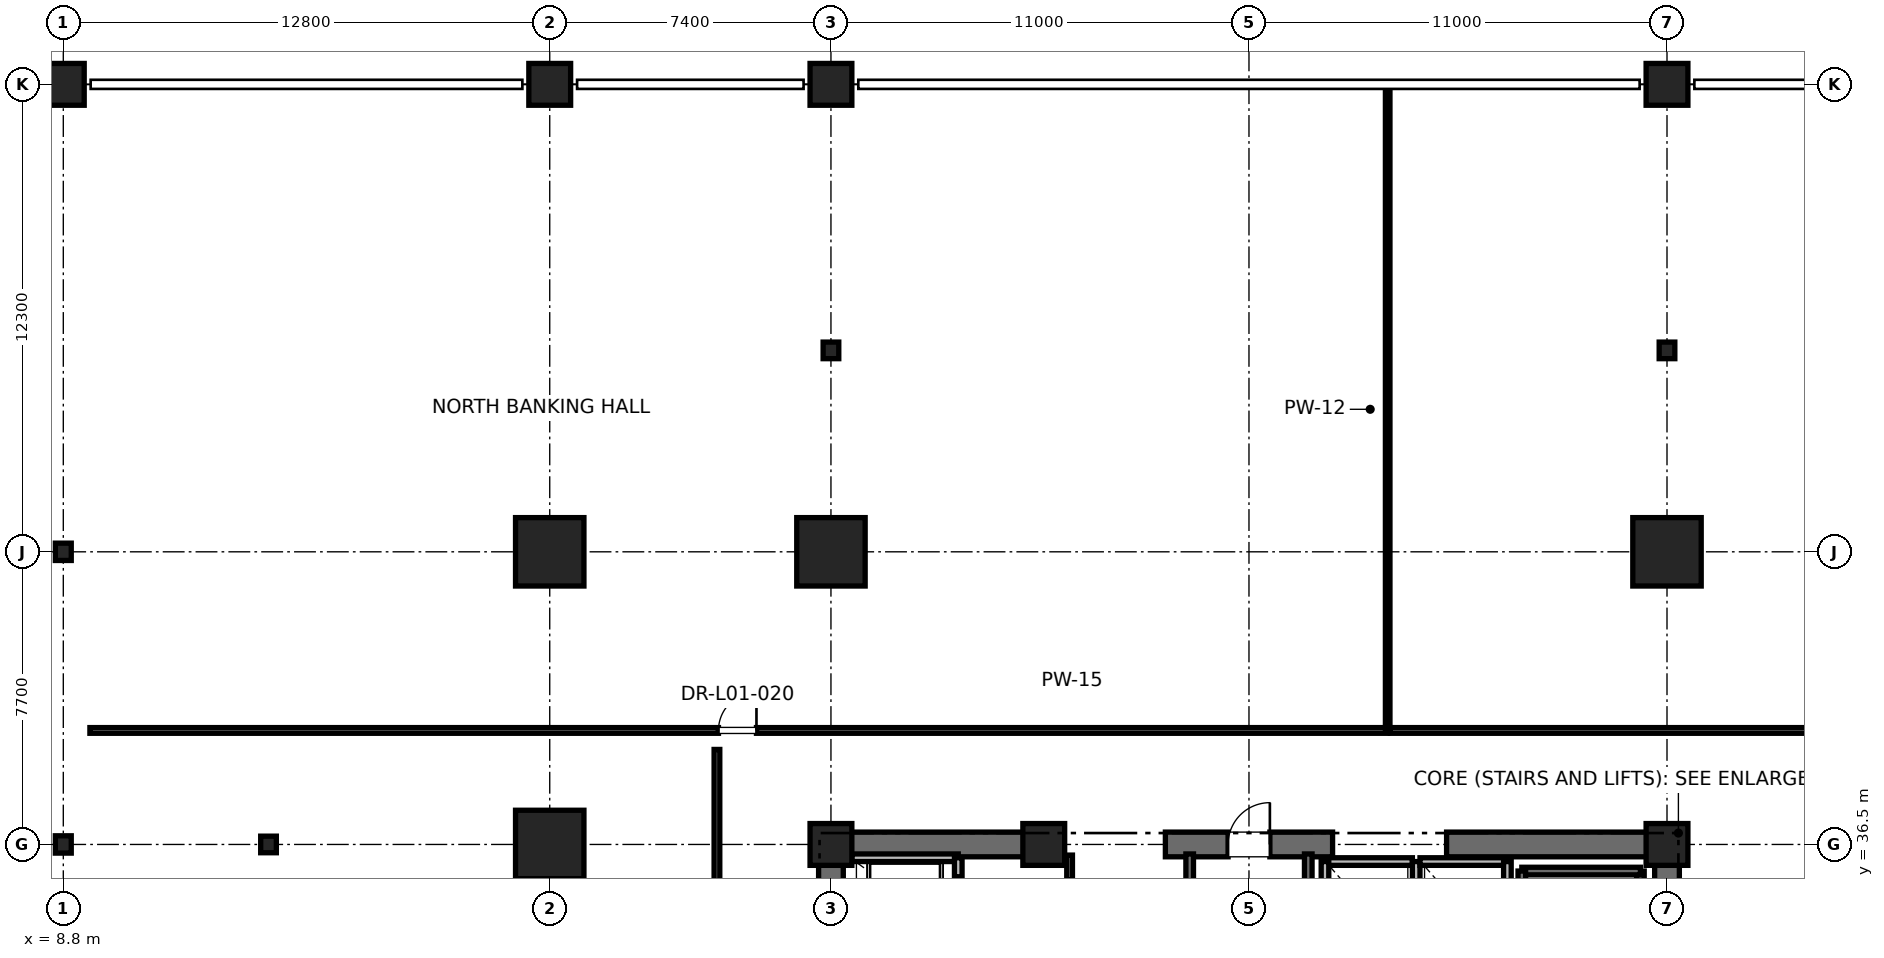
"""IFC4 building model, lengths in metres.
Left out: names, types, materials, properties, quantities, classifications, styles, units other than length and angle.
Written with IfcOpenShell. Run it as: python <this file> out.ifc"""

import sys

from ifc_helpers import new_model, si_unit, direction, frame, frame_2d, origin, origin_2d, place, context, subcontext, project, spatial, rectangle, i_section, extrude, element, fill, save


model = new_model("IFC4")
c1 = context("Model", 3, precision=1e-05, world=origin(), true_north=direction((0.0, 1.0)))
c2 = subcontext(c1, "Body", "Model", "MODEL_VIEW")
j1 = project(units=[si_unit("LENGTHUNIT", "METRE"), si_unit("PLANEANGLEUNIT", "RADIAN")], contexts=[c1])
p1 = place(None, origin())
s1 = spatial("IfcSite", under=j1, at=p1, CompositionType="ELEMENT")
p2 = place(p1, origin())
s2 = spatial("IfcBuilding", under=s1, at=p2, CompositionType="ELEMENT")
p3 = place(p2, frame((0.0, 0.0, 6.0)))
s3 = spatial("IfcBuildingStorey", under=s2, at=p3, CompositionType="ELEMENT", Elevation=6.0)
for number, where, z_axis, x_axis in (
    (1, (29.0, 44.2, 0.0), (0.0, 0.0, 1.0), (1.0, 0.0, 0.0)),
    (2, (51.0, 44.2, 0.0), (0.0, 0.0, 1.0), (1.0, 0.0, 0.0)),
    (3, (21.6, 36.5, 0.0), (0.0, 0.0, 1.0), (1.0, 0.0, 0.0)),
    (4, (21.6, 44.2, 0.0), (0.0, 0.0, 1.0), (1.0, 0.0, 0.0)),
):
    element("IfcColumn", number, at=place(p3, frame(where, z_axis=z_axis, x_axis=x_axis)), inside=s3, PredefinedType="COLUMN", context=c2, shape_type="SweptSolid", body=[
        extrude(rectangle(XDim=1.8, YDim=1.8, at=origin_2d()), origin(), (0.0, 0.0, 1.0), 5.2),
    ])
for number, where, z_axis, x_axis in (
    (5, (14.2, 36.5, 0.0), (0.0, 0.0, 1.0), (1.0, 0.0, 0.0)),
    (6, (29.0, 49.5, 0.0), (0.0, 0.0, 1.0), (1.0, 0.0, 0.0)),
    (7, (51.0, 49.5, 0.0), (0.0, 0.0, 1.0), (1.0, 0.0, 0.0)),
):
    element("IfcColumn", number, at=place(p3, frame(where, z_axis=z_axis, x_axis=x_axis)), inside=s3, PredefinedType="COLUMN", context=c2, shape_type="SweptSolid", body=[
        extrude(i_section(OverallWidth=0.412, OverallDepth=0.437, WebThickness=0.036, FlangeThickness=0.058, FilletRadius=0.015, at=origin_2d()), origin(), (0.0, 0.0, 1.0), 5.2),
    ])
for number, where, z_axis, x_axis in (
    (8, (29.0, 36.5, 0.0), (0.0, 0.0, 1.0), (1.0, 0.0, 0.0)),
    (9, (51.0, 36.5, 0.0), (0.0, 0.0, 1.0), (1.0, 0.0, 0.0)),
    (10, (34.6, 36.5, 0.0), (0.0, 0.0, 1.0), (1.0, 0.0, 0.0)),
):
    element("IfcColumn", number, at=place(p3, frame(where, z_axis=z_axis, x_axis=x_axis)), inside=s3, PredefinedType="PILASTER", context=c2, shape_type="SweptSolid", body=[
        extrude(rectangle(XDim=1.1, YDim=1.1, at=origin_2d()), origin(), (0.0, 0.0, 1.0), 5.2),
    ])
for number, where, z_axis, x_axis in (
    (11, (8.8, 56.5, 0.0), (0.0, 0.0, 1.0), (1.0, 0.0, 0.0)),
    (12, (21.6, 56.5, 0.0), (0.0, 0.0, 1.0), (1.0, 0.0, 0.0)),
    (13, (29.0, 56.5, 0.0), (0.0, 0.0, 1.0), (1.0, 0.0, 0.0)),
    (14, (51.0, 56.5, 0.0), (0.0, 0.0, 1.0), (1.0, 0.0, 0.0)),
):
    element("IfcColumn", number, at=place(p3, frame(where, z_axis=z_axis, x_axis=x_axis)), inside=s3, PredefinedType="COLUMN", context=c2, shape_type="SweptSolid", body=[
        extrude(rectangle(XDim=1.1, YDim=1.1, at=origin_2d()), origin(), (0.0, 0.0, 1.0), 5.2),
    ])
for number, where, z_axis, x_axis in (
    (15, (8.8, 36.5, 0.0), (0.0, 0.0, 1.0), (1.0, 0.0, 0.0)),
    (16, (8.8, 44.2, 0.0), (0.0, 0.0, 1.0), (1.0, 0.0, 0.0)),
):
    element("IfcColumn", number, at=place(p3, frame(where, z_axis=z_axis, x_axis=x_axis)), inside=s3, PredefinedType="COLUMN", context=c2, shape_type="SweptSolid", body=[
        extrude(i_section(OverallWidth=0.418, OverallDepth=0.456, WebThickness=0.042, FlangeThickness=0.067, FilletRadius=0.015, at=origin_2d()), origin(), (0.0, 0.0, 1.0), 5.2),
    ])
p4 = place(p3, frame((29.0, 36.5, 0.0), z_axis=(0.0, 0.0, 1.0), x_axis=(1.0, 0.0, 0.0)))
e17 = element("IfcWall", 17, at=p4, inside=s3, PredefinedType="SHEAR", context=c2, shape_type="SweptSolid", body=[
    extrude(rectangle(XDim=5.8, YDim=0.65, at=frame_2d((2.9, 0.0))), origin(), (0.0, 0.0, 1.0), 4.92),
])
p5 = place(p3, frame((37.8, 36.5, 0.0), z_axis=(0.0, 0.0, 1.0), x_axis=(1.0, 0.0, 0.0)))
e18 = element("IfcWall", 18, at=p5, inside=s3, PredefinedType="SHEAR", context=c2, shape_type="SweptSolid", body=[
    extrude(rectangle(XDim=4.4, YDim=0.65, at=frame_2d((2.2, 0.0))), origin(), (0.0, 0.0, 1.0), 4.92),
])
p6 = place(p5, frame((1.65, 0.0, 0.0)))
e19 = element("IfcOpeningElement", 19, at=p6, cuts=e18, PredefinedType="OPENING", context=c2, shape_type="SweptSolid", body=[
    extrude(rectangle(XDim=1.1, YDim=2.15, at=frame_2d((0.55, 1.075))), frame((0.0, 0.325, 0.0), z_axis=(0.0, -1.0, 0.0), x_axis=(1.0, 0.0, 0.0)), (0.0, 0.0, 1.0), 0.65),
])
for number, where, z_axis, x_axis in (
    (20, (45.2, 36.5, 0.0), (0.0, 0.0, 1.0), (1.0, 0.0, 0.0)),
    (21, (29.0, 30.7, 0.0), (0.0, 0.0, 1.0), (0.0, 1.0, 0.0)),
):
    element("IfcWall", number, at=place(p3, frame(where, z_axis=z_axis, x_axis=x_axis)), inside=s3, PredefinedType="SHEAR", context=c2, shape_type="SweptSolid", body=[
        extrude(rectangle(XDim=5.8, YDim=0.65, at=frame_2d((2.9, 0.0))), origin(), (0.0, 0.0, 1.0), 4.92),
    ])
p7 = place(p3, frame((51.0, 27.7, 0.0), z_axis=(0.0, 0.0, 1.0), x_axis=(0.0, 1.0, 0.0)))
e22 = element("IfcWall", 22, at=p7, inside=s3, PredefinedType="SHEAR", context=c2, shape_type="SweptSolid", body=[
    extrude(rectangle(XDim=8.8, YDim=0.65, at=frame_2d((4.4, 0.0))), origin(), (0.0, 0.0, 1.0), 4.92),
])
p8 = place(p3, frame((50.3, 27.65, 0.0), z_axis=(0.0, 0.0, 1.0), x_axis=(0.0, 1.0, 0.0)))
e23 = element("IfcWall", 23, at=p8, inside=s3, PredefinedType="SOLIDWALL", context=c2, shape_type="SweptSolid", body=[
    extrude(rectangle(XDim=8.15, YDim=0.2, at=frame_2d((4.075, 0.0))), origin(), (0.0, 0.0, 1.0), 4.92),
])
p9 = place(p3, frame((47.18, 35.8, 0.0), z_axis=(0.0, 0.0, 1.0), x_axis=(1.0, 0.0, 0.0)))
e24 = element("IfcWall", 24, at=p9, inside=s3, PredefinedType="SOLIDWALL", context=c2, shape_type="SweptSolid", body=[
    extrude(rectangle(XDim=3.12, YDim=0.2, at=frame_2d((1.56, 0.0))), origin(), (0.0, 0.0, 1.0), 4.92),
])
p10 = place(p3, frame((47.18, 27.62, 0.0), z_axis=(0.0, 0.0, 1.0), x_axis=(0.0, 1.0, 0.0)))
e25 = element("IfcWall", 25, at=p10, inside=s3, PredefinedType="SOLIDWALL", context=c2, shape_type="SweptSolid", body=[
    extrude(rectangle(XDim=8.18, YDim=0.2, at=frame_2d((4.09, 0.0))), origin(), (0.0, 0.0, 1.0), 4.92),
])
p11 = place(p3, frame((38.44, 27.38, 0.0), z_axis=(0.0, 0.0, 1.0), x_axis=(0.0, 1.0, 0.0)))
e26 = element("IfcWall", 26, at=p11, inside=s3, PredefinedType="SOLIDWALL", context=c2, shape_type="SweptSolid", body=[
    extrude(rectangle(XDim=8.87, YDim=0.2, at=frame_2d((4.435, 0.0))), origin(), (0.0, 0.0, 1.0), 4.92),
])
p12 = place(p3, frame((41.56, 27.68, 0.0), z_axis=(0.0, 0.0, 1.0), x_axis=(0.0, 1.0, 0.0)))
e27 = element("IfcWall", 27, at=p12, inside=s3, PredefinedType="SOLIDWALL", context=c2, shape_type="SweptSolid", body=[
    extrude(rectangle(XDim=8.57, YDim=0.2, at=frame_2d((4.285, 0.0))), origin(), (0.0, 0.0, 1.0), 4.92),
])
p13 = place(p3, frame((32.35, 36.15, 0.0), z_axis=(0.0, 0.0, 1.0), x_axis=(-1.0, 0.0, 0.0)))
e28 = element("IfcWall", 28, at=p13, inside=s3, PredefinedType="SOLIDWALL", context=c2, shape_type="SweptSolid", body=[
    extrude(rectangle(XDim=2.8, YDim=0.2, at=frame_2d((1.4, 0.0))), origin(), (0.0, 0.0, 1.0), 3.979),
])
p14 = place(p3, frame((32.35, 34.05, 0.0), z_axis=(0.0, 0.0, 1.0), x_axis=(0.0, 1.0, 0.0)))
e29 = element("IfcWall", 29, at=p14, inside=s3, PredefinedType="SOLIDWALL", context=c2, shape_type="SweptSolid", body=[
    extrude(rectangle(XDim=2.1, YDim=0.2, at=frame_2d((1.05, 0.0))), origin(), (0.0, 0.0, 1.0), 4.92),
])
p15 = place(p14, frame((0.5, 0.0, 0.0)))
e30 = element("IfcOpeningElement", 30, at=p15, cuts=e29, PredefinedType="OPENING", context=c2, shape_type="SweptSolid", body=[
    extrude(rectangle(XDim=1.1, YDim=2.2, at=frame_2d((0.55, 1.1))), frame((0.0, 0.1, 0.0), z_axis=(0.0, -1.0, 0.0), x_axis=(1.0, 0.0, 0.0)), (0.0, 0.0, 1.0), 0.2),
])
p16 = place(p3, frame((44.3, 36.05, 0.0), z_axis=(0.0, 0.0, 1.0), x_axis=(-1.0, 0.0, 0.0)))
e31 = element("IfcWall", 31, at=p16, inside=s3, PredefinedType="SOLIDWALL", context=c2, shape_type="SweptSolid", body=[
    extrude(rectangle(XDim=2.3, YDim=0.2, at=frame_2d((1.15, 0.0))), origin(), (0.0, 0.0, 1.0), 3.7),
])
for number, where, z_axis, x_axis in (
    (32, (42.0, 36.05, 0.0), (0.0, 0.0, 1.0), (0.0, -1.0, 0.0)),
    (33, (44.4, 33.45, 0.0), (0.0, 0.0, 1.0), (0.0, 1.0, 0.0)),
):
    element("IfcWall", number, at=place(p3, frame(where, z_axis=z_axis, x_axis=x_axis)), inside=s3, PredefinedType="SOLIDWALL", context=c2, shape_type="SweptSolid", body=[
        extrude(rectangle(XDim=2.6, YDim=0.2, at=frame_2d((1.3, 0.0))), origin(), (0.0, 0.0, 1.0), 3.7),
    ])
p17 = place(p3, frame((46.8, 36.05, 0.0), z_axis=(0.0, 0.0, 1.0), x_axis=(-1.0, 0.0, 0.0)))
e34 = element("IfcWall", 34, at=p17, inside=s3, PredefinedType="SOLIDWALL", context=c2, shape_type="SweptSolid", body=[
    extrude(rectangle(XDim=2.3, YDim=0.2, at=frame_2d((1.15, 0.0))), origin(), (0.0, 0.0, 1.0), 3.7),
])
p18 = place(p3, frame((46.8, 33.45, 0.0), z_axis=(0.0, 0.0, 1.0), x_axis=(0.0, 1.0, 0.0)))
e35 = element("IfcWall", 35, at=p18, inside=s3, PredefinedType="SOLIDWALL", context=c2, shape_type="SweptSolid", body=[
    extrude(rectangle(XDim=2.6, YDim=0.2, at=frame_2d((1.3, 0.0))), origin(), (0.0, 0.0, 1.0), 4.92),
])
p19 = place(p3, frame((35.28, 33.95, 0.0), z_axis=(0.0, 0.0, 1.0), x_axis=(0.0, 1.0, 0.0)))
e36 = element("IfcWall", 36, at=p19, inside=s3, PredefinedType="PARTITIONING", context=c2, shape_type="SweptSolid", body=[
    extrude(rectangle(XDim=2.27, YDim=0.15, at=frame_2d((1.135, 0.0))), origin(), (0.0, 0.0, 1.0), 2.85),
])
p20 = place(p19, frame((0.66, 0.0, 0.0)))
e37 = element("IfcOpeningElement", 37, at=p20, cuts=e36, PredefinedType="OPENING", context=c2, shape_type="SweptSolid", body=[
    extrude(rectangle(XDim=0.95, YDim=2.15, at=frame_2d((0.475, 1.075))), frame((0.0, 0.075, 0.0), z_axis=(0.0, -1.0, 0.0), x_axis=(1.0, 0.0, 0.0)), (0.0, 0.0, 1.0), 0.15),
])
p21 = place(p3, frame((9.5, 39.5, 0.0), z_axis=(0.0, 0.0, 1.0), x_axis=(1.0, 0.0, 0.0)))
e38 = element("IfcWall", 38, at=p21, inside=s3, PredefinedType="PARTITIONING", context=c2, shape_type="SweptSolid", body=[
    extrude(rectangle(XDim=34.15, YDim=0.15, at=frame_2d((17.075, 0.0))), origin(), (0.0, 0.0, 1.0), 2.85),
])
p22 = place(p21, frame((16.54, 0.0, 0.0)))
e39 = element("IfcOpeningElement", 39, at=p22, cuts=e38, PredefinedType="OPENING", context=c2, shape_type="SweptSolid", body=[
    extrude(rectangle(XDim=1.0, YDim=2.15, at=frame_2d((0.5, 1.075))), frame((0.0, 0.075, 0.0), z_axis=(0.0, -1.0, 0.0), x_axis=(1.0, 0.0, 0.0)), (0.0, 0.0, 1.0), 0.15),
])
p23 = place(p3, frame((43.65, 39.5, 0.0), z_axis=(0.0, 0.0, 1.0), x_axis=(0.0, 1.0, 0.0)))
e40 = element("IfcWall", 40, at=p23, inside=s3, PredefinedType="PARTITIONING", context=c2, shape_type="SweptSolid", body=[
    extrude(rectangle(XDim=16.9, YDim=0.12, at=frame_2d((8.45, 0.0))), origin(), (0.0, 0.0, 1.0), 2.85),
])
p24 = place(p3, frame((43.72, 39.5, 0.0), z_axis=(0.0, 0.0, 1.0), x_axis=(1.0, 0.0, 0.0)))
e41 = element("IfcWall", 41, at=p24, inside=s3, PredefinedType="PARTITIONING", context=c2, shape_type="SweptSolid", body=[
    extrude(rectangle(XDim=27.78, YDim=0.15, at=frame_2d((13.89, 0.0))), origin(), (0.0, 0.0, 1.0), 2.85),
])
p25 = place(p24, frame((13.14, 0.0, 0.0)))
e42 = element("IfcOpeningElement", 42, at=p25, cuts=e41, PredefinedType="OPENING", context=c2, shape_type="SweptSolid", body=[
    extrude(rectangle(XDim=1.5, YDim=2.25, at=frame_2d((0.75, 1.125))), frame((0.0, 0.075, 0.0), z_axis=(0.0, -1.0, 0.0), x_axis=(1.0, 0.0, 0.0)), (0.0, 0.0, 1.0), 0.15),
])
p26 = place(p3, frame((26.0, 22.05, 0.0), z_axis=(0.0, 0.0, 1.0), x_axis=(0.0, 1.0, 0.0)))
e43 = element("IfcWall", 43, at=p26, inside=s3, PredefinedType="PARTITIONING", context=c2, shape_type="SweptSolid", body=[
    extrude(rectangle(XDim=16.95, YDim=0.15, at=frame_2d((8.475, 0.0))), origin(), (0.0, 0.0, 1.0), 2.85),
])
p27 = place(p26, frame((6.675, 0.0, 0.0)))
e44 = element("IfcOpeningElement", 44, at=p27, cuts=e43, PredefinedType="OPENING", context=c2, shape_type="SweptSolid", body=[
    extrude(rectangle(XDim=1.0, YDim=2.15, at=frame_2d((0.5, 1.075))), frame((0.0, 0.075, 0.0), z_axis=(0.0, -1.0, 0.0), x_axis=(1.0, 0.0, 0.0)), (0.0, 0.0, 1.0), 0.15),
])
p28 = place(p6, origin())
e45 = element("IfcDoor", 45, at=p28, inside=s3, OperationType="SINGLE_SWING_RIGHT", PredefinedType="DOOR", context=c2, shape_type="SweptSolid", body=[
    extrude(rectangle(XDim=1.1, YDim=2.15, at=frame_2d((0.55, 1.075))), frame((0.0, 0.025, 0.0), z_axis=(0.0, -1.0, 0.0), x_axis=(1.0, 0.0, 0.0)), (0.0, 0.0, 1.0), 0.05),
])
fill(e19, e45)
p29 = place(p15, origin())
e46 = element("IfcDoor", 46, at=p29, inside=s3, OperationType="SLIDING_TO_RIGHT", PredefinedType="DOOR", context=c2, shape_type="SweptSolid", body=[
    extrude(rectangle(XDim=1.1, YDim=2.2, at=frame_2d((0.55, 1.1))), frame((0.0, 0.025, 0.0), z_axis=(0.0, -1.0, 0.0), x_axis=(1.0, 0.0, 0.0)), (0.0, 0.0, 1.0), 0.05),
])
fill(e30, e46)
p30 = place(p22, origin())
e47 = element("IfcDoor", 47, at=p30, inside=s3, OperationType="SINGLE_SWING_RIGHT", PredefinedType="DOOR", context=c2, shape_type="SweptSolid", body=[
    extrude(rectangle(XDim=1.0, YDim=2.15, at=frame_2d((0.5, 1.075))), frame((0.0, 0.025, 0.0), z_axis=(0.0, -1.0, 0.0), x_axis=(1.0, 0.0, 0.0)), (0.0, 0.0, 1.0), 0.05),
])
fill(e39, e47)
save(model, sys.argv[1])
